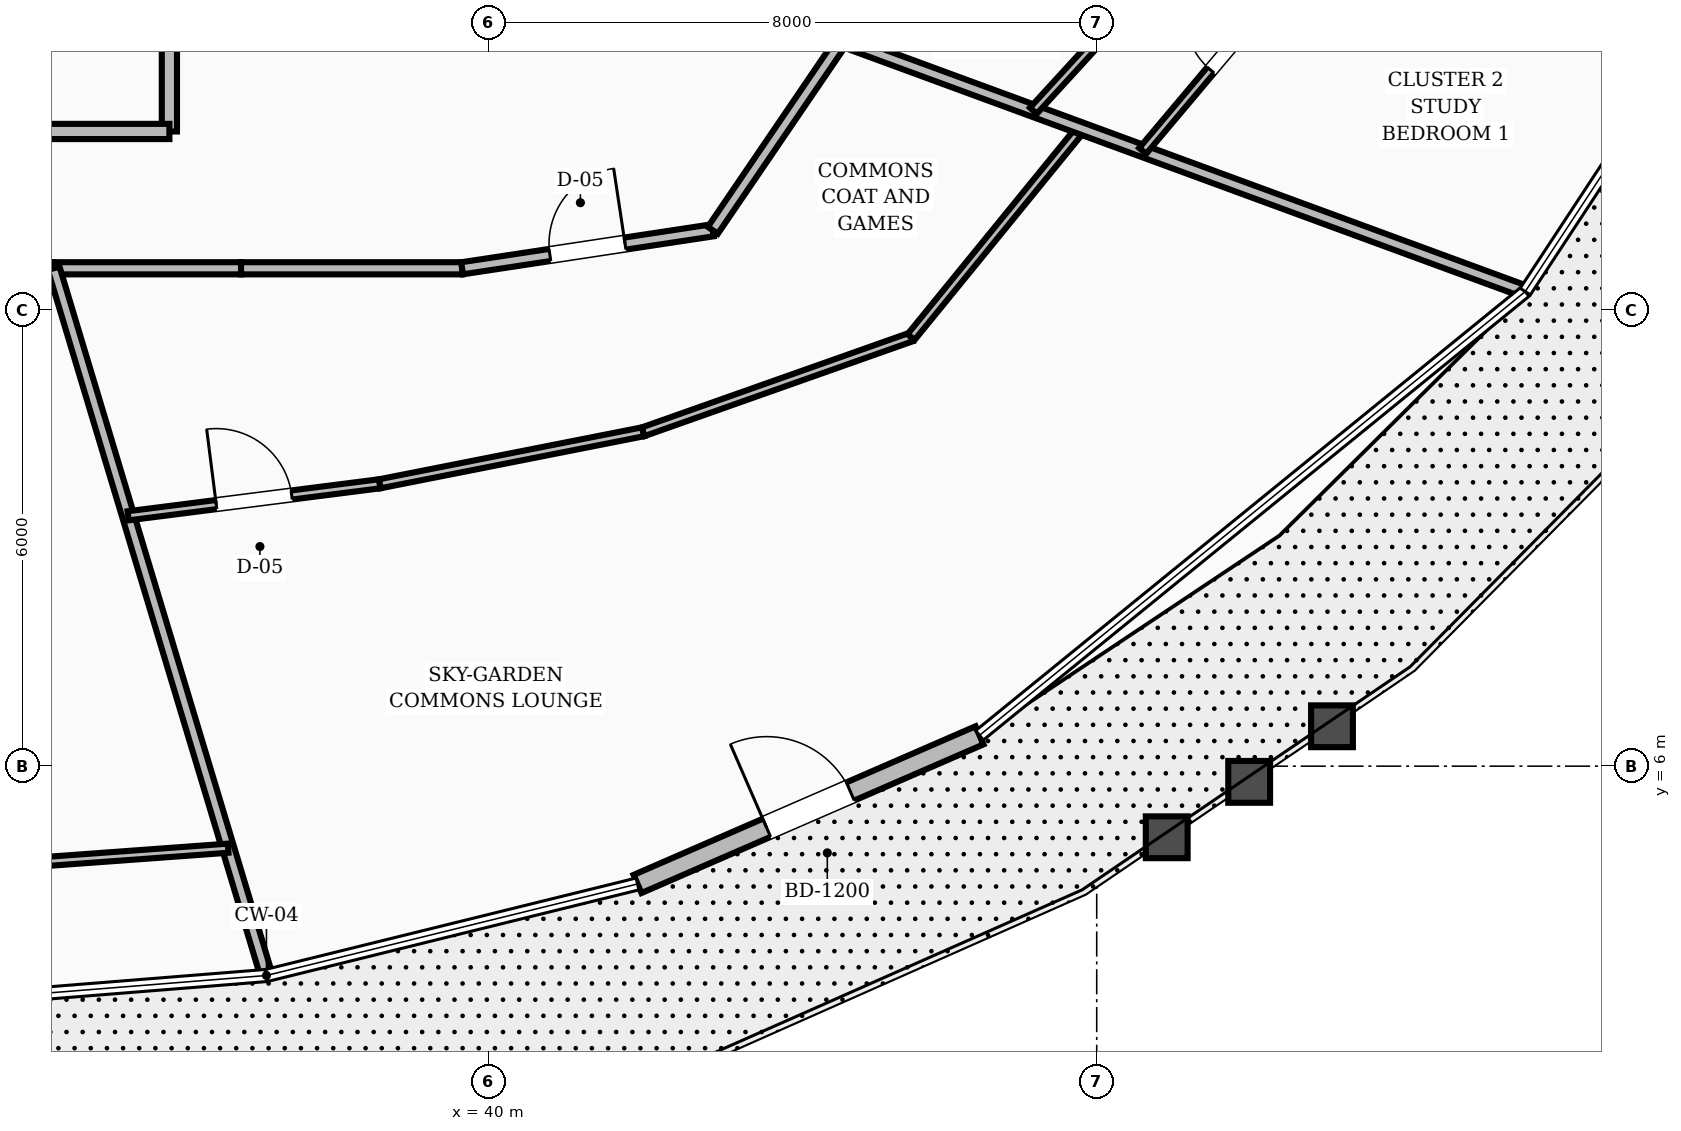
"""IFC4 building model, lengths in metres.
Left out: names, types, materials, properties, quantities, classifications, styles, units other than length and angle.
Written with IfcOpenShell. Run it as: python <this file> out.ifc"""

import sys

from ifc_helpers import new_model, si_unit, direction, frame, frame_2d, origin, place, context, subcontext, project, spatial, rectangle, extrude, element, fill, save


model = new_model("IFC4")
c1 = context("Model", 3, precision=1e-05, world=origin(), true_north=direction((0.0, 1.0)))
c2 = subcontext(c1, "Body", "Model", "MODEL_VIEW")
j1 = project(units=[si_unit("LENGTHUNIT", "METRE"), si_unit("PLANEANGLEUNIT", "RADIAN")], contexts=[c1])
p1 = place(None, origin())
s1 = spatial("IfcSite", under=j1, at=p1, CompositionType="ELEMENT")
p2 = place(p1, origin())
s2 = spatial("IfcBuilding", under=s1, at=p2, CompositionType="ELEMENT")
p3 = place(p2, frame((0.0, 0.0, 131.6)))
s3 = spatial("IfcBuildingStorey", under=s2, at=p3, CompositionType="ELEMENT", Elevation=131.6)
p4 = place(p3, frame((41.959, 4.45, 0.0), z_axis=(0.0, 0.0, 1.0), x_axis=(0.917135712646, 0.398575067697, 0.0)))
e1 = element("IfcWall", 1, at=p4, inside=s3, PredefinedType="STANDARD", context=c2, shape_type="SweptSolid", body=[
    extrude(rectangle(XDim=4.906, YDim=0.26, at=frame_2d((2.453, 0.0))), origin(), (0.0, 0.0, 1.0), 2.82),
])
p5 = place(p4, frame((1.853, 0.0, 0.0)))
e2 = element("IfcOpeningElement", 2, at=p5, cuts=e1, PredefinedType="OPENING", context=c2, shape_type="SweptSolid", body=[
    extrude(rectangle(XDim=1.2, YDim=2.15, at=frame_2d((0.6, 1.075))), frame((0.0, 0.14, 0.0), z_axis=(0.0, -1.0, 0.0), x_axis=(1.0, 0.0, 0.0)), (0.0, 0.0, 1.0), 0.28),
])
p6 = place(p3, frame((35.8, 14.35, 0.0), z_axis=(0.0, 0.0, 1.0), x_axis=(0.0, 1.0, 0.0)))
e3 = element("IfcWall", 3, at=p6, inside=s3, PredefinedType="SOLIDWALL", context=c2, shape_type="SweptSolid", body=[
    extrude(rectangle(XDim=2.2, YDim=0.2, at=frame_2d((1.1, 0.0))), origin(), (0.0, 0.0, 1.0), 2.8),
])
p7 = place(p3, frame((28.2, 14.35, 0.0), z_axis=(0.0, 0.0, 1.0), x_axis=(1.0, 0.0, 0.0)))
e4 = element("IfcWall", 4, at=p7, inside=s3, PredefinedType="SOLIDWALL", context=c2, shape_type="SweptSolid", body=[
    extrude(rectangle(XDim=7.6, YDim=0.2, at=frame_2d((3.8, 0.0))), origin(), (0.0, 0.0, 1.0), 2.8),
])
p8 = place(p7, frame((3.2, 0.0, 0.0)))
e5 = element("IfcOpeningElement", 5, at=p8, cuts=e4, PredefinedType="OPENING", context=c2, shape_type="SweptSolid", body=[
    extrude(rectangle(XDim=1.2, YDim=2.1, at=frame_2d((0.6, 1.05))), frame((0.0, 0.11, 0.0), z_axis=(0.0, -1.0, 0.0), x_axis=(1.0, 0.0, 0.0)), (0.0, 0.0, 1.0), 0.22),
])
p9 = place(p3, frame((32.0, 12.55, 0.0), z_axis=(0.0, 0.0, 1.0), x_axis=(1.0, 0.0, 0.0)))
e6 = element("IfcWall", 6, at=p9, inside=s3, PredefinedType="SOLIDWALL", context=c2, shape_type="SweptSolid", body=[
    extrude(rectangle(XDim=2.278, YDim=0.16, at=frame_2d((1.139, 0.0))), origin(), (0.0, 0.0, 1.0), 2.8),
])
p10 = place(p3, frame((34.278, 12.55, 0.0), z_axis=(0.0, 0.0, 1.0), x_axis=(1.0, 0.0, 0.0)))
e7 = element("IfcWall", 7, at=p10, inside=s3, PredefinedType="SOLIDWALL", context=c2, shape_type="SweptSolid", body=[
    extrude(rectangle(XDim=2.465, YDim=0.16, at=frame_2d((1.232, 0.0))), origin(), (0.0, 0.0, 1.0), 2.8),
])
p11 = place(p3, frame((36.743, 12.55, 0.0), z_axis=(0.0, 0.0, 1.0), x_axis=(1.0, 0.0, 0.0)))
e8 = element("IfcWall", 8, at=p11, inside=s3, PredefinedType="SOLIDWALL", context=c2, shape_type="SweptSolid", body=[
    extrude(rectangle(XDim=2.908, YDim=0.16, at=frame_2d((1.454, 0.0))), origin(), (0.0, 0.0, 1.0), 2.8),
])
p12 = place(p3, frame((39.651, 12.55, 0.0), z_axis=(0.0, 0.0, 1.0), x_axis=(0.988710906508, 0.149835721217, 0.0)))
e9 = element("IfcWall", 9, at=p12, inside=s3, PredefinedType="SOLIDWALL", context=c2, shape_type="SweptSolid", body=[
    extrude(rectangle(XDim=3.337, YDim=0.16, at=frame_2d((1.668, 0.0))), origin(), (0.0, 0.0, 1.0), 2.8),
])
p13 = place(p12, frame((1.168, 0.0, 0.0)))
e10 = element("IfcOpeningElement", 10, at=p13, cuts=e9, PredefinedType="OPENING", context=c2, shape_type="SweptSolid", body=[
    extrude(rectangle(XDim=1.0, YDim=2.1, at=frame_2d((0.5, 1.05))), frame((0.0, 0.09, 0.0), z_axis=(0.0, -1.0, 0.0), x_axis=(1.0, 0.0, 0.0)), (0.0, 0.0, 1.0), 0.18),
])
p14 = place(p3, frame((42.95, 13.05, 0.0), z_axis=(0.0, 0.0, 1.0), x_axis=(0.562674669208, 0.826678423955, 0.0)))
e11 = element("IfcWall", 11, at=p14, inside=s3, PredefinedType="SOLIDWALL", context=c2, shape_type="SweptSolid", body=[
    extrude(rectangle(XDim=3.021, YDim=0.16, at=frame_2d((1.511, 0.0))), origin(), (0.0, 0.0, 1.0), 2.8),
])
p15 = place(p3, frame((34.278, 12.55, 0.0), z_axis=(0.0, 0.0, 1.0), x_axis=(0.288114793877, -0.957595877993, 0.0)))
e12 = element("IfcWall", 12, at=p15, inside=s3, PredefinedType="SOLIDWALL", context=c2, shape_type="SweptSolid", body=[
    extrude(rectangle(XDim=9.666, YDim=0.16, at=frame_2d((4.833, 0.0))), origin(), (0.0, 0.0, 1.0), 2.8),
])
p16 = place(p3, frame((35.257, 9.294, 0.0), z_axis=(0.0, 0.0, 1.0), x_axis=(0.991998577966, 0.126249044799, 0.0)))
e13 = element("IfcWall", 13, at=p16, inside=s3, PredefinedType="PARTITIONING", context=c2, shape_type="SweptSolid", body=[
    extrude(rectangle(XDim=3.338, YDim=0.12, at=frame_2d((1.669, 0.0))), origin(), (0.0, 0.0, 1.0), 2.8),
])
p17 = place(p16, frame((1.169, 0.0, 0.0)))
e14 = element("IfcOpeningElement", 14, at=p17, cuts=e13, PredefinedType="OPENING", context=c2, shape_type="SweptSolid", body=[
    extrude(rectangle(XDim=1.0, YDim=2.1, at=frame_2d((0.5, 1.05))), frame((0.0, 0.07, 0.0), z_axis=(0.0, -1.0, 0.0), x_axis=(1.0, 0.0, 0.0)), (0.0, 0.0, 1.0), 0.14),
])
p18 = place(p3, frame((38.568, 9.715, 0.0), z_axis=(0.0, 0.0, 1.0), x_axis=(0.981048447043, 0.19376259844, 0.0)))
e15 = element("IfcWall", 15, at=p18, inside=s3, PredefinedType="PARTITIONING", context=c2, shape_type="SweptSolid", body=[
    extrude(rectangle(XDim=3.532, YDim=0.12, at=frame_2d((1.766, 0.0))), origin(), (0.0, 0.0, 1.0), 2.8),
])
p19 = place(p3, frame((42.033, 10.399, 0.0), z_axis=(0.0, 0.0, 1.0), x_axis=(0.942821433358, 0.333298282024, 0.0)))
e16 = element("IfcWall", 16, at=p19, inside=s3, PredefinedType="PARTITIONING", context=c2, shape_type="SweptSolid", body=[
    extrude(rectangle(XDim=3.739, YDim=0.12, at=frame_2d((1.869, 0.0))), origin(), (0.0, 0.0, 1.0), 2.8),
])
p20 = place(p3, frame((45.558, 11.646, 0.0), z_axis=(0.0, 0.0, 1.0), x_axis=(0.631780340891, 0.775147470397, 0.0)))
e17 = element("IfcWall", 17, at=p20, inside=s3, PredefinedType="PARTITIONING", context=c2, shape_type="SweptSolid", body=[
    extrude(rectangle(XDim=3.542, YDim=0.12, at=frame_2d((1.771, 0.0))), origin(), (0.0, 0.0, 1.0), 2.8),
])
p21 = place(p3, frame((44.65, 15.548, 0.0), z_axis=(0.0, 0.0, 1.0), x_axis=(0.938597960156, -0.345012853661, 0.0)))
e18 = element("IfcWall", 18, at=p21, inside=s3, PredefinedType="SOLIDWALL", context=c2, shape_type="SweptSolid", body=[
    extrude(rectangle(XDim=9.526, YDim=0.16, at=frame_2d((4.763, 0.0))), origin(), (0.0, 0.0, 1.0), 2.8),
])
p22 = place(p3, frame((47.167, 14.623, 0.0), z_axis=(0.0, 0.0, 1.0), x_axis=(0.675494490503, 0.737365033956, 0.0)))
e19 = element("IfcWall", 19, at=p22, inside=s3, PredefinedType="PARTITIONING", context=c2, shape_type="SweptSolid", body=[
    extrude(rectangle(XDim=3.555, YDim=0.12, at=frame_2d((1.778, 0.0))), origin(), (0.0, 0.0, 1.0), 2.8),
])
p23 = place(p3, frame((48.605, 14.094, 0.0), z_axis=(0.0, 0.0, 1.0), x_axis=(0.644194213793, 0.764861958078, 0.0)))
e20 = element("IfcWall", 20, at=p23, inside=s3, PredefinedType="PARTITIONING", context=c2, shape_type="SweptSolid", body=[
    extrude(rectangle(XDim=3.729, YDim=0.12, at=frame_2d((1.864, 0.0))), origin(), (0.0, 0.0, 1.0), 2.8),
])
p24 = place(p23, frame((1.389, 0.0, 0.0)))
e21 = element("IfcOpeningElement", 21, at=p24, cuts=e20, PredefinedType="OPENING", context=c2, shape_type="SweptSolid", body=[
    extrude(rectangle(XDim=0.95, YDim=2.1, at=frame_2d((0.475, 1.05))), frame((0.0, 0.07, 0.0), z_axis=(0.0, -1.0, 0.0), x_axis=(1.0, 0.0, 0.0)), (0.0, 0.0, 1.0), 0.14),
])
p25 = place(p3, frame((32.0, 4.587, 0.0), z_axis=(0.0, 0.0, 1.0), x_axis=(0.997355230651, 0.072681110984, 0.0)))
e22 = element("IfcWall", 22, at=p25, inside=s3, PredefinedType="PARTITIONING", context=c2, shape_type="SweptSolid", body=[
    extrude(rectangle(XDim=4.585, YDim=0.12, at=frame_2d((2.292, 0.0))), origin(), (0.0, 0.0, 1.0), 2.8),
])
p26 = place(p5, origin())
e23 = element("IfcDoor", 23, at=p26, inside=s3, OperationType="SINGLE_SWING_LEFT", PredefinedType="DOOR", context=c2, shape_type="SweptSolid", body=[
    extrude(rectangle(XDim=1.2, YDim=2.15, at=frame_2d((0.6, 1.075))), frame((0.0, 0.025, 0.0), z_axis=(0.0, -1.0, 0.0), x_axis=(1.0, 0.0, 0.0)), (0.0, 0.0, 1.0), 0.05),
])
fill(e2, e23)
p27 = place(p13, origin())
e24 = element("IfcDoor", 24, at=p27, inside=s3, OperationType="SINGLE_SWING_RIGHT", PredefinedType="DOOR", context=c2, shape_type="SweptSolid", body=[
    extrude(rectangle(XDim=1.0, YDim=2.1, at=frame_2d((0.5, 1.05))), frame((0.0, 0.025, 0.0), z_axis=(0.0, -1.0, 0.0), x_axis=(1.0, 0.0, 0.0)), (0.0, 0.0, 1.0), 0.05),
])
fill(e10, e24)
p28 = place(p17, origin())
e25 = element("IfcDoor", 25, at=p28, inside=s3, OperationType="SINGLE_SWING_LEFT", PredefinedType="DOOR", context=c2, shape_type="SweptSolid", body=[
    extrude(rectangle(XDim=1.0, YDim=2.1, at=frame_2d((0.5, 1.05))), frame((0.0, 0.025, 0.0), z_axis=(0.0, -1.0, 0.0), x_axis=(1.0, 0.0, 0.0)), (0.0, 0.0, 1.0), 0.05),
])
fill(e14, e25)
p29 = place(p24, origin())
e26 = element("IfcDoor", 26, at=p29, inside=s3, OperationType="SINGLE_SWING_RIGHT", PredefinedType="DOOR", context=c2, shape_type="SweptSolid", body=[
    extrude(rectangle(XDim=0.95, YDim=2.1, at=frame_2d((0.475, 1.05))), frame((0.0, 0.025, 0.0), z_axis=(0.0, -1.0, 0.0), x_axis=(1.0, 0.0, 0.0)), (0.0, 0.0, 1.0), 0.05),
])
fill(e21, e26)
save(model, sys.argv[1])
